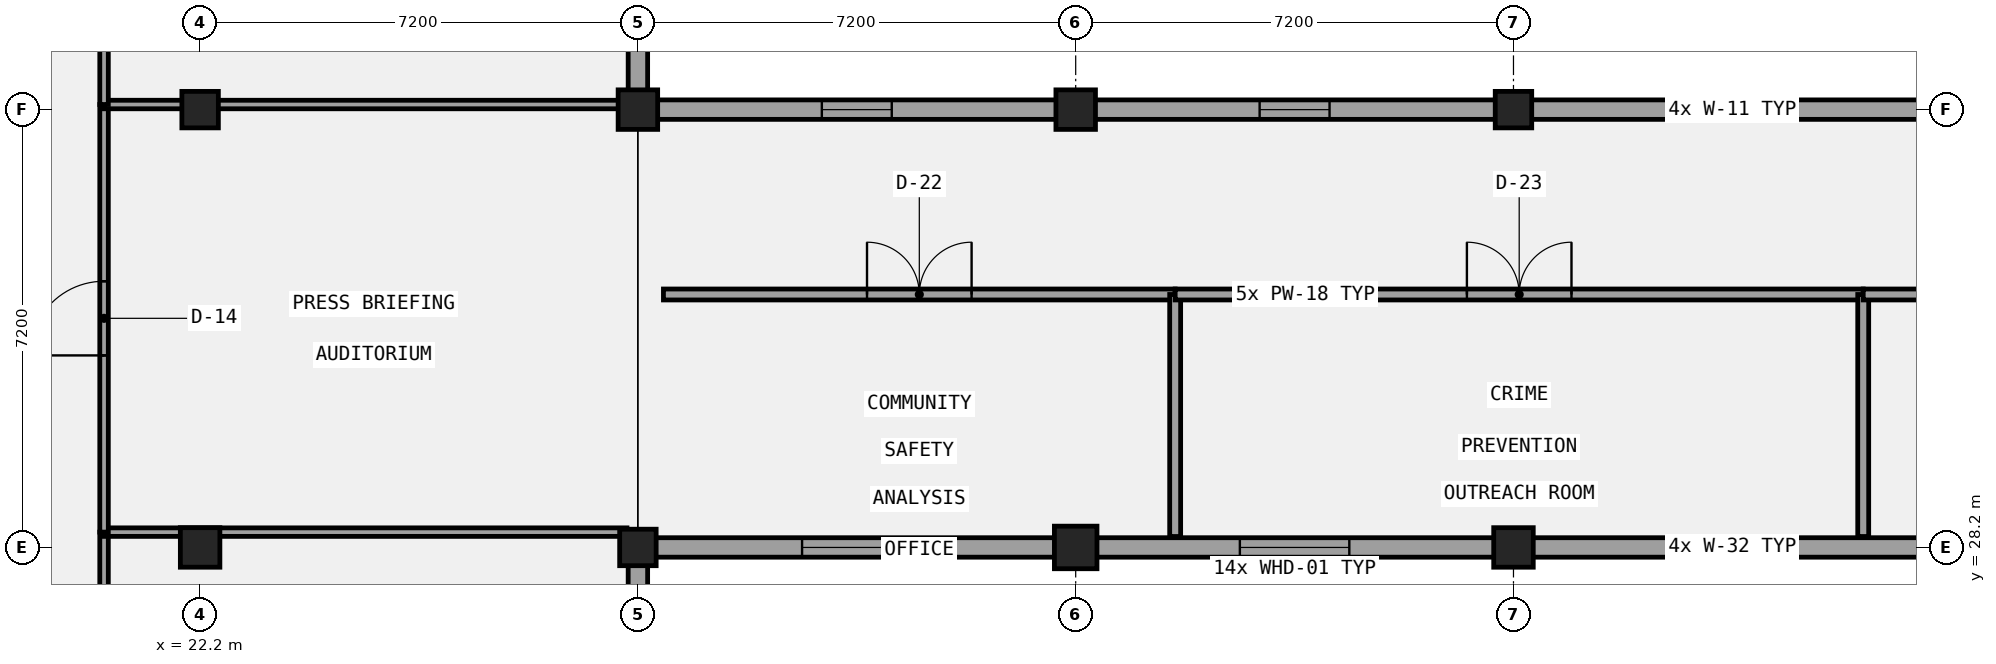
"""IFC4 building model, lengths in metres.
Left out: names, types, materials, properties, quantities, classifications, styles, units other than length and angle.
Written with IfcOpenShell. Run it as: python <this file> out.ifc"""

import sys

from ifc_helpers import new_model, si_unit, direction, frame, frame_2d, origin, origin_2d, place, context, subcontext, project, spatial, rectangle, circle, extrude, element, fill, save


model = new_model("IFC4")
c1 = context("Model", 3, precision=1e-05, world=origin(), true_north=direction((0.0, 1.0)))
c2 = subcontext(c1, "Body", "Model", "MODEL_VIEW")
j1 = project(units=[si_unit("LENGTHUNIT", "METRE"), si_unit("PLANEANGLEUNIT", "RADIAN")], contexts=[c1])
p1 = place(None, origin())
s1 = spatial("IfcSite", under=j1, at=p1, CompositionType="ELEMENT")
p2 = place(p1, origin())
s2 = spatial("IfcBuilding", under=s1, at=p2, CompositionType="ELEMENT")
p3 = place(p2, frame((0.0, 0.0, 9.6)))
s3 = spatial("IfcBuildingStorey", under=s2, at=p3, CompositionType="ELEMENT", Elevation=9.6)
p4 = place(p3, frame((22.2, 28.2, 0.0), z_axis=(0.0, 0.0, 1.0), x_axis=(1.0, 0.0, 0.0)))
e1 = element("IfcColumn", 1, at=p4, inside=s3, PredefinedType="COLUMN", context=c2, shape_type="SweptSolid", body=[
    extrude(rectangle(XDim=0.65, YDim=0.65, at=origin_2d()), origin(), (0.0, 0.0, 1.0), 4.2),
])
for number, where, z_axis, x_axis in (
    (2, (22.2, 35.4, 0.0), (0.0, 0.0, 1.0), (1.0, 0.0, 0.0)),
    (3, (29.4, 28.2, 0.0), (0.0, 0.0, 1.0), (1.0, 0.0, 0.0)),
):
    element("IfcColumn", number, at=place(p3, frame(where, z_axis=z_axis, x_axis=x_axis)), inside=s3, PredefinedType="COLUMN", context=c2, shape_type="SweptSolid", body=[
        extrude(rectangle(XDim=0.6, YDim=0.6, at=origin_2d()), origin(), (0.0, 0.0, 1.0), 4.2),
    ])
p5 = place(p3, frame((29.4, 35.4, 0.0), z_axis=(0.0, 0.0, 1.0), x_axis=(1.0, 0.0, 0.0)))
e4 = element("IfcColumn", 4, at=p5, inside=s3, PredefinedType="COLUMN", context=c2, shape_type="SweptSolid", body=[
    extrude(circle(Radius=0.325, at=origin_2d()), origin(), (0.0, 0.0, 1.0), 4.2),
])
p6 = place(p3, frame((36.6, 28.2, 0.0), z_axis=(0.0, 0.0, 1.0), x_axis=(1.0, 0.0, 0.0)))
e5 = element("IfcColumn", 5, at=p6, inside=s3, PredefinedType="COLUMN", context=c2, shape_type="SweptSolid", body=[
    extrude(rectangle(XDim=0.7, YDim=0.7, at=origin_2d()), origin(), (0.0, 0.0, 1.0), 4.2),
])
for number, where, z_axis, x_axis in (
    (6, (36.6, 35.4, 0.0), (0.0, 0.0, 1.0), (1.0, 0.0, 0.0)),
    (7, (43.8, 28.2, 0.0), (0.0, 0.0, 1.0), (1.0, 0.0, 0.0)),
):
    element("IfcColumn", number, at=place(p3, frame(where, z_axis=z_axis, x_axis=x_axis)), inside=s3, PredefinedType="COLUMN", context=c2, shape_type="SweptSolid", body=[
        extrude(rectangle(XDim=0.65, YDim=0.65, at=origin_2d()), origin(), (0.0, 0.0, 1.0), 4.2),
    ])
p7 = place(p3, frame((43.8, 35.4, 0.0), z_axis=(0.0, 0.0, 1.0), x_axis=(1.0, 0.0, 0.0)))
e8 = element("IfcColumn", 8, at=p7, inside=s3, PredefinedType="COLUMN", context=c2, shape_type="SweptSolid", body=[
    extrude(rectangle(XDim=0.6, YDim=0.6, at=origin_2d()), origin(), (0.0, 0.0, 1.0), 4.2),
])
p8 = place(p3, frame((29.4, 21.16, 0.0), z_axis=(0.0, 0.0, 1.0), x_axis=(0.0, 1.0, 0.0)))
e9 = element("IfcWall", 9, at=p8, inside=s3, PredefinedType="SOLIDWALL", context=c2, shape_type="SweptSolid", body=[
    extrude(rectangle(XDim=6.88, YDim=0.32, at=frame_2d((3.44, 0.0))), origin(), (0.0, 0.0, 1.0), 3.14),
])
p9 = place(p8, frame((2.94, 0.0, 1.0)))
e10 = element("IfcOpeningElement", 10, at=p9, cuts=e9, PredefinedType="OPENING", context=c2, shape_type="SweptSolid", body=[
    extrude(rectangle(XDim=1.0, YDim=1.4, at=frame_2d((0.5, 0.7))), frame((0.0, 0.17, 0.0), z_axis=(0.0, -1.0, 0.0), x_axis=(1.0, 0.0, 0.0)), (0.0, 0.0, 1.0), 0.34),
])
p10 = place(p3, frame((29.24, 28.2, 0.0), z_axis=(0.0, 0.0, 1.0), x_axis=(1.0, 0.0, 0.0)))
e11 = element("IfcWall", 11, at=p10, inside=s3, PredefinedType="SOLIDWALL", context=c2, shape_type="SweptSolid", body=[
    extrude(rectangle(XDim=50.37, YDim=0.32, at=frame_2d((25.185, 0.0))), origin(), (0.0, 0.0, 1.0), 2.94),
])
p11 = place(p10, frame((2.86, 0.0, 1.0)))
e12 = element("IfcOpeningElement", 12, at=p11, cuts=e11, PredefinedType="OPENING", context=c2, shape_type="SweptSolid", body=[
    extrude(rectangle(XDim=1.8, YDim=1.65, at=frame_2d((0.9, 0.825))), frame((0.0, 0.17, 0.0), z_axis=(0.0, -1.0, 0.0), x_axis=(1.0, 0.0, 0.0)), (0.0, 0.0, 1.0), 0.34),
])
p12 = place(p10, frame((10.06, 0.0, 1.0)))
e13 = element("IfcOpeningElement", 13, at=p12, cuts=e11, PredefinedType="OPENING", context=c2, shape_type="SweptSolid", body=[
    extrude(rectangle(XDim=1.8, YDim=1.65, at=frame_2d((0.9, 0.825))), frame((0.0, 0.17, 0.0), z_axis=(0.0, -1.0, 0.0), x_axis=(1.0, 0.0, 0.0)), (0.0, 0.0, 1.0), 0.34),
])
p13 = place(p10, frame((17.26, 0.0, 1.0)))
e14 = element("IfcOpeningElement", 14, at=p13, cuts=e11, PredefinedType="OPENING", context=c2, shape_type="SweptSolid", body=[
    extrude(rectangle(XDim=1.8, YDim=1.65, at=frame_2d((0.9, 0.825))), frame((0.0, 0.17, 0.0), z_axis=(0.0, -1.0, 0.0), x_axis=(1.0, 0.0, 0.0)), (0.0, 0.0, 1.0), 0.34),
])
p14 = place(p10, frame((24.46, 0.0, 1.0)))
e15 = element("IfcOpeningElement", 15, at=p14, cuts=e11, PredefinedType="OPENING", context=c2, shape_type="SweptSolid", body=[
    extrude(rectangle(XDim=1.8, YDim=1.65, at=frame_2d((0.9, 0.825))), frame((0.0, 0.17, 0.0), z_axis=(0.0, -1.0, 0.0), x_axis=(1.0, 0.0, 0.0)), (0.0, 0.0, 1.0), 0.34),
])
p15 = place(p10, frame((31.66, 0.0, 1.0)))
e16 = element("IfcOpeningElement", 16, at=p15, cuts=e11, PredefinedType="OPENING", context=c2, shape_type="SweptSolid", body=[
    extrude(rectangle(XDim=1.8, YDim=1.65, at=frame_2d((0.9, 0.825))), frame((0.0, 0.17, 0.0), z_axis=(0.0, -1.0, 0.0), x_axis=(1.0, 0.0, 0.0)), (0.0, 0.0, 1.0), 0.34),
])
p16 = place(p10, frame((38.86, 0.0, 1.0)))
e17 = element("IfcOpeningElement", 17, at=p16, cuts=e11, PredefinedType="OPENING", context=c2, shape_type="SweptSolid", body=[
    extrude(rectangle(XDim=1.8, YDim=1.65, at=frame_2d((0.9, 0.825))), frame((0.0, 0.17, 0.0), z_axis=(0.0, -1.0, 0.0), x_axis=(1.0, 0.0, 0.0)), (0.0, 0.0, 1.0), 0.34),
])
p17 = place(p10, frame((45.965, 0.0, 1.0)))
e18 = element("IfcOpeningElement", 18, at=p17, cuts=e11, PredefinedType="OPENING", context=c2, shape_type="SweptSolid", body=[
    extrude(rectangle(XDim=1.8, YDim=1.65, at=frame_2d((0.9, 0.825))), frame((0.0, 0.17, 0.0), z_axis=(0.0, -1.0, 0.0), x_axis=(1.0, 0.0, 0.0)), (0.0, 0.0, 1.0), 0.34),
])
p18 = place(p3, frame((29.4, 35.56, 0.0), z_axis=(0.0, 0.0, 1.0), x_axis=(0.0, 1.0, 0.0)))
e19 = element("IfcWall", 19, at=p18, inside=s3, PredefinedType="SOLIDWALL", context=c2, shape_type="SweptSolid", body=[
    extrude(rectangle(XDim=21.28, YDim=0.32, at=frame_2d((10.64, 0.0))), origin(), (0.0, 0.0, 1.0), 2.94),
])
p19 = place(p18, frame((2.42, 0.0, 1.0)))
e20 = element("IfcOpeningElement", 20, at=p19, cuts=e19, PredefinedType="OPENING", context=c2, shape_type="SweptSolid", body=[
    extrude(rectangle(XDim=2.2, YDim=1.65, at=frame_2d((1.1, 0.825))), frame((0.0, 0.17, 0.0), z_axis=(0.0, -1.0, 0.0), x_axis=(1.0, 0.0, 0.0)), (0.0, 0.0, 1.0), 0.34),
])
p20 = place(p18, frame((9.54, 0.0, 1.0)))
e21 = element("IfcOpeningElement", 21, at=p20, cuts=e19, PredefinedType="OPENING", context=c2, shape_type="SweptSolid", body=[
    extrude(rectangle(XDim=2.2, YDim=1.65, at=frame_2d((1.1, 0.825))), frame((0.0, 0.17, 0.0), z_axis=(0.0, -1.0, 0.0), x_axis=(1.0, 0.0, 0.0)), (0.0, 0.0, 1.0), 0.34),
])
p21 = place(p18, frame((16.66, 0.0, 1.0)))
e22 = element("IfcOpeningElement", 22, at=p21, cuts=e19, PredefinedType="OPENING", context=c2, shape_type="SweptSolid", body=[
    extrude(rectangle(XDim=2.2, YDim=1.65, at=frame_2d((1.1, 0.825))), frame((0.0, 0.17, 0.0), z_axis=(0.0, -1.0, 0.0), x_axis=(1.0, 0.0, 0.0)), (0.0, 0.0, 1.0), 0.34),
])
p22 = place(p3, frame((79.61, 35.4, 0.0), z_axis=(0.0, 0.0, 1.0), x_axis=(-1.0, 0.0, 0.0)))
e23 = element("IfcWall", 23, at=p22, inside=s3, PredefinedType="SOLIDWALL", context=c2, shape_type="SweptSolid", body=[
    extrude(rectangle(XDim=50.37, YDim=0.32, at=frame_2d((25.185, 0.0))), origin(), (0.0, 0.0, 1.0), 2.94),
])
p23 = place(p22, frame((46.035, 0.0, 1.0)))
e24 = element("IfcOpeningElement", 24, at=p23, cuts=e23, PredefinedType="OPENING", context=c2, shape_type="SweptSolid", body=[
    extrude(rectangle(XDim=1.15, YDim=1.4, at=frame_2d((0.575, 0.7))), frame((0.0, 0.17, 0.0), z_axis=(0.0, -1.0, 0.0), x_axis=(1.0, 0.0, 0.0)), (0.0, 0.0, 1.0), 0.34),
])
p24 = place(p22, frame((38.835, 0.0, 1.0)))
e25 = element("IfcOpeningElement", 25, at=p24, cuts=e23, PredefinedType="OPENING", context=c2, shape_type="SweptSolid", body=[
    extrude(rectangle(XDim=1.15, YDim=1.4, at=frame_2d((0.575, 0.7))), frame((0.0, 0.17, 0.0), z_axis=(0.0, -1.0, 0.0), x_axis=(1.0, 0.0, 0.0)), (0.0, 0.0, 1.0), 0.34),
])
p25 = place(p22, frame((31.635, 0.0, 1.0)))
e26 = element("IfcOpeningElement", 26, at=p25, cuts=e23, PredefinedType="OPENING", context=c2, shape_type="SweptSolid", body=[
    extrude(rectangle(XDim=1.15, YDim=1.4, at=frame_2d((0.575, 0.7))), frame((0.0, 0.17, 0.0), z_axis=(0.0, -1.0, 0.0), x_axis=(1.0, 0.0, 0.0)), (0.0, 0.0, 1.0), 0.34),
])
p26 = place(p22, frame((24.435, 0.0, 1.0)))
e27 = element("IfcOpeningElement", 27, at=p26, cuts=e23, PredefinedType="OPENING", context=c2, shape_type="SweptSolid", body=[
    extrude(rectangle(XDim=1.15, YDim=1.4, at=frame_2d((0.575, 0.7))), frame((0.0, 0.17, 0.0), z_axis=(0.0, -1.0, 0.0), x_axis=(1.0, 0.0, 0.0)), (0.0, 0.0, 1.0), 0.34),
])
p27 = place(p22, frame((17.235, 0.0, 1.0)))
e28 = element("IfcOpeningElement", 28, at=p27, cuts=e23, PredefinedType="OPENING", context=c2, shape_type="SweptSolid", body=[
    extrude(rectangle(XDim=1.15, YDim=1.4, at=frame_2d((0.575, 0.7))), frame((0.0, 0.17, 0.0), z_axis=(0.0, -1.0, 0.0), x_axis=(1.0, 0.0, 0.0)), (0.0, 0.0, 1.0), 0.34),
])
p28 = place(p22, frame((10.035, 0.0, 1.0)))
e29 = element("IfcOpeningElement", 29, at=p28, cuts=e23, PredefinedType="OPENING", context=c2, shape_type="SweptSolid", body=[
    extrude(rectangle(XDim=1.15, YDim=1.4, at=frame_2d((0.575, 0.7))), frame((0.0, 0.17, 0.0), z_axis=(0.0, -1.0, 0.0), x_axis=(1.0, 0.0, 0.0)), (0.0, 0.0, 1.0), 0.34),
])
p29 = place(p22, frame((2.93, 0.0, 1.0)))
e30 = element("IfcOpeningElement", 30, at=p29, cuts=e23, PredefinedType="OPENING", context=c2, shape_type="SweptSolid", body=[
    extrude(rectangle(XDim=1.15, YDim=1.4, at=frame_2d((0.575, 0.7))), frame((0.0, 0.17, 0.0), z_axis=(0.0, -1.0, 0.0), x_axis=(1.0, 0.0, 0.0)), (0.0, 0.0, 1.0), 0.34),
])
p30 = place(p3, frame((20.62, 21.42, 0.0), z_axis=(0.0, 0.0, 1.0), x_axis=(0.0, 1.0, 0.0)))
e31 = element("IfcWall", 31, at=p30, inside=s3, PredefinedType="PARTITIONING", context=c2, shape_type="SweptSolid", body=[
    extrude(rectangle(XDim=7.032, YDim=0.14, at=frame_2d((3.516, 0.0))), origin(), (0.0, 0.0, 1.0), 3.94),
])
p31 = place(p30, frame((2.906, 0.0, 0.0)))
e32 = element("IfcOpeningElement", 32, at=p31, cuts=e31, PredefinedType="OPENING", context=c2, shape_type="SweptSolid", body=[
    extrude(rectangle(XDim=1.22, YDim=2.1, at=frame_2d((0.61, 1.05))), frame((0.0, 0.08, 0.0), z_axis=(0.0, -1.0, 0.0), x_axis=(1.0, 0.0, 0.0)), (0.0, 0.0, 1.0), 0.16),
])
p32 = place(p3, frame((20.62, 28.452, 0.0), z_axis=(0.0, 0.0, 1.0), x_axis=(1.0, 0.0, 0.0)))
e33 = element("IfcWall", 33, at=p32, inside=s3, PredefinedType="PARTITIONING", context=c2, shape_type="SweptSolid", body=[
    extrude(rectangle(XDim=8.6, YDim=0.14, at=frame_2d((4.3, 0.0))), origin(), (0.0, 0.0, 1.0), 2.74),
])
p33 = place(p3, frame((20.62, 28.452, 0.0), z_axis=(0.0, 0.0, 1.0), x_axis=(0.0, 1.0, 0.0)))
e34 = element("IfcWall", 34, at=p33, inside=s3, PredefinedType="PARTITIONING", context=c2, shape_type="SweptSolid", body=[
    extrude(rectangle(XDim=7.032, YDim=0.14, at=frame_2d((3.516, 0.0))), origin(), (0.0, 0.0, 1.0), 3.94),
])
p34 = place(p33, frame((2.906, 0.0, 0.0)))
e35 = element("IfcOpeningElement", 35, at=p34, cuts=e34, PredefinedType="OPENING", context=c2, shape_type="SweptSolid", body=[
    extrude(rectangle(XDim=1.22, YDim=2.22, at=frame_2d((0.61, 1.11))), frame((0.0, 0.08, 0.0), z_axis=(0.0, -1.0, 0.0), x_axis=(1.0, 0.0, 0.0)), (0.0, 0.0, 1.0), 0.16),
])
p35 = place(p3, frame((20.62, 35.484, 0.0), z_axis=(0.0, 0.0, 1.0), x_axis=(1.0, 0.0, 0.0)))
e36 = element("IfcWall", 36, at=p35, inside=s3, PredefinedType="PARTITIONING", context=c2, shape_type="SweptSolid", body=[
    extrude(rectangle(XDim=8.6, YDim=0.14, at=frame_2d((4.3, 0.0))), origin(), (0.0, 0.0, 1.0), 2.74),
])
p36 = place(p3, frame((20.62, 35.484, 0.0), z_axis=(0.0, 0.0, 1.0), x_axis=(0.0, 1.0, 0.0)))
e37 = element("IfcWall", 37, at=p36, inside=s3, PredefinedType="PARTITIONING", context=c2, shape_type="SweptSolid", body=[
    extrude(rectangle(XDim=7.032, YDim=0.14, at=frame_2d((3.516, 0.0))), origin(), (0.0, 0.0, 1.0), 3.94),
])
p37 = place(p36, frame((2.906, 0.0, 0.0)))
e38 = element("IfcOpeningElement", 38, at=p37, cuts=e37, PredefinedType="OPENING", context=c2, shape_type="SweptSolid", body=[
    extrude(rectangle(XDim=1.22, YDim=2.35, at=frame_2d((0.61, 1.175))), frame((0.0, 0.08, 0.0), z_axis=(0.0, -1.0, 0.0), x_axis=(1.0, 0.0, 0.0)), (0.0, 0.0, 1.0), 0.16),
])
p38 = place(p3, frame((29.82, 32.36, 0.0), z_axis=(0.0, 0.0, 1.0), x_axis=(1.0, 0.0, 0.0)))
e39 = element("IfcWall", 39, at=p38, inside=s3, PredefinedType="PARTITIONING", context=c2, shape_type="SweptSolid", body=[
    extrude(rectangle(XDim=8.416, YDim=0.18, at=frame_2d((4.208, 0.0))), origin(), (0.0, 0.0, 1.0), 3.94),
])
p39 = place(p38, frame((3.348, 0.0, 0.0)))
e40 = element("IfcOpeningElement", 40, at=p39, cuts=e39, PredefinedType="OPENING", context=c2, shape_type="SweptSolid", body=[
    extrude(rectangle(XDim=1.72, YDim=2.1, at=frame_2d((0.86, 1.05))), frame((0.0, 0.1, 0.0), z_axis=(0.0, -1.0, 0.0), x_axis=(1.0, 0.0, 0.0)), (0.0, 0.0, 1.0), 0.2),
])
p40 = place(p3, frame((38.236, 28.38, 0.0), z_axis=(0.0, 0.0, 1.0), x_axis=(0.0, 1.0, 0.0)))
e41 = element("IfcWall", 41, at=p40, inside=s3, PredefinedType="PARTITIONING", context=c2, shape_type="SweptSolid", body=[
    extrude(rectangle(XDim=3.98, YDim=0.18, at=frame_2d((1.99, 0.0))), origin(), (0.0, 0.0, 1.0), 3.94),
])
p41 = place(p3, frame((38.236, 32.36, 0.0), z_axis=(0.0, 0.0, 1.0), x_axis=(1.0, 0.0, 0.0)))
e42 = element("IfcWall", 42, at=p41, inside=s3, PredefinedType="PARTITIONING", context=c2, shape_type="SweptSolid", body=[
    extrude(rectangle(XDim=11.316, YDim=0.18, at=frame_2d((5.658, 0.0))), origin(), (0.0, 0.0, 1.0), 3.94),
])
p42 = place(p41, frame((4.798, 0.0, 0.0)))
e43 = element("IfcOpeningElement", 43, at=p42, cuts=e42, PredefinedType="OPENING", context=c2, shape_type="SweptSolid", body=[
    extrude(rectangle(XDim=1.72, YDim=2.22, at=frame_2d((0.86, 1.11))), frame((0.0, 0.1, 0.0), z_axis=(0.0, -1.0, 0.0), x_axis=(1.0, 0.0, 0.0)), (0.0, 0.0, 1.0), 0.2),
])
p43 = place(p3, frame((49.552, 28.38, 0.0), z_axis=(0.0, 0.0, 1.0), x_axis=(0.0, 1.0, 0.0)))
e44 = element("IfcWall", 44, at=p43, inside=s3, PredefinedType="PARTITIONING", context=c2, shape_type="SweptSolid", body=[
    extrude(rectangle(XDim=3.98, YDim=0.18, at=frame_2d((1.99, 0.0))), origin(), (0.0, 0.0, 1.0), 3.94),
])
p44 = place(p3, frame((49.552, 32.36, 0.0), z_axis=(0.0, 0.0, 1.0), x_axis=(1.0, 0.0, 0.0)))
e45 = element("IfcWall", 45, at=p44, inside=s3, PredefinedType="PARTITIONING", context=c2, shape_type="SweptSolid", body=[
    extrude(rectangle(XDim=9.866, YDim=0.18, at=frame_2d((4.933, 0.0))), origin(), (0.0, 0.0, 1.0), 3.94),
])
p45 = place(p44, frame((4.073, 0.0, 0.0)))
e46 = element("IfcOpeningElement", 46, at=p45, cuts=e45, PredefinedType="OPENING", context=c2, shape_type="SweptSolid", body=[
    extrude(rectangle(XDim=1.72, YDim=2.35, at=frame_2d((0.86, 1.175))), frame((0.0, 0.1, 0.0), z_axis=(0.0, -1.0, 0.0), x_axis=(1.0, 0.0, 0.0)), (0.0, 0.0, 1.0), 0.2),
])
p46 = place(p11, origin())
e47 = element("IfcWindow", 47, at=p46, inside=s3, PartitioningType="SINGLE_PANEL", PredefinedType="WINDOW", context=c2, shape_type="SweptSolid", body=[
    extrude(rectangle(XDim=1.8, YDim=1.65, at=frame_2d((0.9, 0.825))), frame((0.0, 0.03, 0.0), z_axis=(0.0, -1.0, 0.0), x_axis=(1.0, 0.0, 0.0)), (0.0, 0.0, 1.0), 0.06),
])
fill(e12, e47)
p47 = place(p12, origin())
e48 = element("IfcWindow", 48, at=p47, inside=s3, PartitioningType="SINGLE_PANEL", PredefinedType="WINDOW", context=c2, shape_type="SweptSolid", body=[
    extrude(rectangle(XDim=1.8, YDim=1.65, at=frame_2d((0.9, 0.825))), frame((0.0, 0.03, 0.0), z_axis=(0.0, -1.0, 0.0), x_axis=(1.0, 0.0, 0.0)), (0.0, 0.0, 1.0), 0.06),
])
fill(e13, e48)
p48 = place(p13, origin())
e49 = element("IfcWindow", 49, at=p48, inside=s3, PartitioningType="SINGLE_PANEL", PredefinedType="WINDOW", context=c2, shape_type="SweptSolid", body=[
    extrude(rectangle(XDim=1.8, YDim=1.65, at=frame_2d((0.9, 0.825))), frame((0.0, 0.03, 0.0), z_axis=(0.0, -1.0, 0.0), x_axis=(1.0, 0.0, 0.0)), (0.0, 0.0, 1.0), 0.06),
])
fill(e14, e49)
p49 = place(p23, origin())
e50 = element("IfcWindow", 50, at=p49, inside=s3, PartitioningType="SINGLE_PANEL", PredefinedType="WINDOW", context=c2, shape_type="SweptSolid", body=[
    extrude(rectangle(XDim=1.15, YDim=1.4, at=frame_2d((0.575, 0.7))), frame((0.0, 0.03, 0.0), z_axis=(0.0, -1.0, 0.0), x_axis=(1.0, 0.0, 0.0)), (0.0, 0.0, 1.0), 0.06),
])
fill(e24, e50)
p50 = place(p24, origin())
e51 = element("IfcWindow", 51, at=p50, inside=s3, PartitioningType="SINGLE_PANEL", PredefinedType="WINDOW", context=c2, shape_type="SweptSolid", body=[
    extrude(rectangle(XDim=1.15, YDim=1.4, at=frame_2d((0.575, 0.7))), frame((0.0, 0.03, 0.0), z_axis=(0.0, -1.0, 0.0), x_axis=(1.0, 0.0, 0.0)), (0.0, 0.0, 1.0), 0.06),
])
fill(e25, e51)
p51 = place(p25, origin())
e52 = element("IfcWindow", 52, at=p51, inside=s3, PartitioningType="SINGLE_PANEL", PredefinedType="WINDOW", context=c2, shape_type="SweptSolid", body=[
    extrude(rectangle(XDim=1.15, YDim=1.4, at=frame_2d((0.575, 0.7))), frame((0.0, 0.03, 0.0), z_axis=(0.0, -1.0, 0.0), x_axis=(1.0, 0.0, 0.0)), (0.0, 0.0, 1.0), 0.06),
])
fill(e26, e52)
p52 = place(p34, origin())
e53 = element("IfcDoor", 53, at=p52, inside=s3, OperationType="SINGLE_SWING_LEFT", PredefinedType="DOOR", context=c2, shape_type="SweptSolid", body=[
    extrude(rectangle(XDim=1.22, YDim=2.22, at=frame_2d((0.61, 1.11))), frame((0.0, 0.025, 0.0), z_axis=(0.0, -1.0, 0.0), x_axis=(1.0, 0.0, 0.0)), (0.0, 0.0, 1.0), 0.05),
])
fill(e35, e53)
p53 = place(p39, frame((1.72, 0.0, 0.0), z_axis=(0.0, 0.0, 1.0), x_axis=(-1.0, 0.0, 0.0)))
e54 = element("IfcDoor", 54, at=p53, inside=s3, OperationType="DOUBLE_DOOR_SINGLE_SWING", PredefinedType="DOOR", context=c2, shape_type="SweptSolid", body=[
    extrude(rectangle(XDim=1.72, YDim=2.1, at=frame_2d((0.86, 1.05))), frame((0.0, 0.025, 0.0), z_axis=(0.0, -1.0, 0.0), x_axis=(1.0, 0.0, 0.0)), (0.0, 0.0, 1.0), 0.05),
])
fill(e40, e54)
p54 = place(p42, frame((1.72, 0.0, 0.0), z_axis=(0.0, 0.0, 1.0), x_axis=(-1.0, 0.0, 0.0)))
e55 = element("IfcDoor", 55, at=p54, inside=s3, OperationType="DOUBLE_DOOR_SINGLE_SWING", PredefinedType="DOOR", context=c2, shape_type="SweptSolid", body=[
    extrude(rectangle(XDim=1.72, YDim=2.22, at=frame_2d((0.86, 1.11))), frame((0.0, 0.025, 0.0), z_axis=(0.0, -1.0, 0.0), x_axis=(1.0, 0.0, 0.0)), (0.0, 0.0, 1.0), 0.05),
])
fill(e43, e55)
save(model, sys.argv[1])
